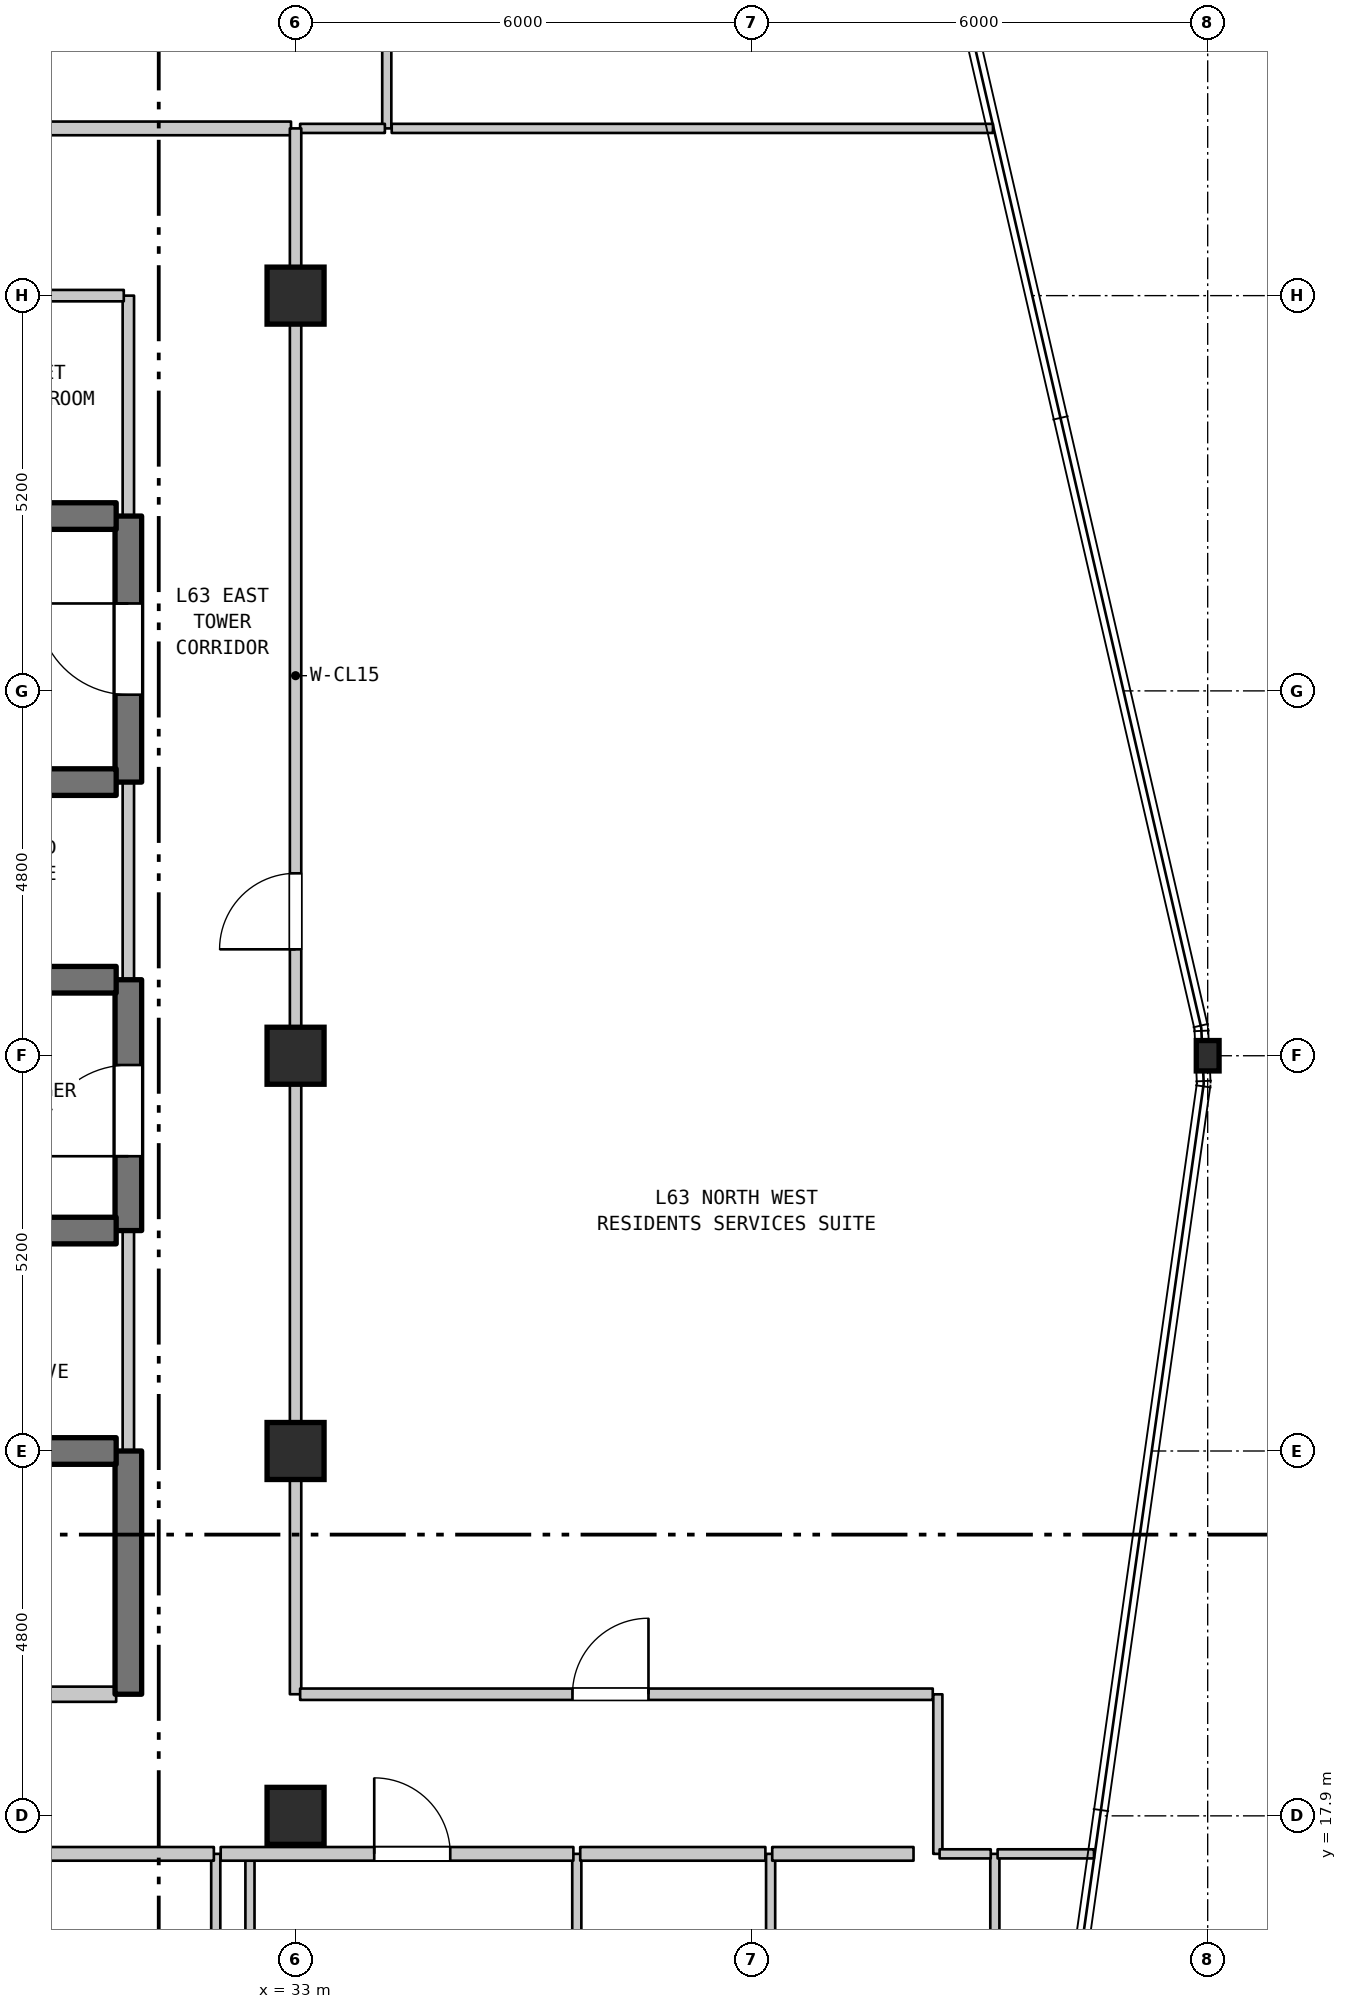
"""IFC4 building model, lengths in metres.
Left out: names, types, materials, properties, quantities, classifications, styles, units other than length and angle.
Written with IfcOpenShell. Run it as: python <this file> out.ifc"""

import sys

from ifc_helpers import new_model, si_unit, direction, frame, frame_2d, origin, origin_2d, place, context, subcontext, project, spatial, rectangle, i_section, extrude, element, fill, save


model = new_model("IFC4")
c1 = context("Model", 3, precision=1e-05, world=origin(), true_north=direction((0.0, 1.0)))
c2 = subcontext(c1, "Body", "Model", "MODEL_VIEW")
j1 = project(units=[si_unit("LENGTHUNIT", "METRE"), si_unit("PLANEANGLEUNIT", "RADIAN")], contexts=[c1])
p1 = place(None, origin())
s1 = spatial("IfcSite", under=j1, at=p1, CompositionType="ELEMENT")
p2 = place(p1, origin())
s2 = spatial("IfcBuilding", under=s1, at=p2, CompositionType="ELEMENT")
p3 = place(p2, frame((0.0, 0.0, 254.7)))
s3 = spatial("IfcBuildingStorey", under=s2, at=p3, CompositionType="ELEMENT", Elevation=254.7)
for number, where, z_axis, x_axis in (
    (1, (33.0, 17.9, 0.0), (0.0, 0.0, 1.0), (1.0, 0.0, 0.0)),
    (2, (33.0, 22.7, 0.0), (0.0, 0.0, 1.0), (1.0, 0.0, 0.0)),
    (3, (33.0, 27.9, 0.0), (0.0, 0.0, 1.0), (1.0, 0.0, 0.0)),
    (4, (33.0, 37.9, 0.0), (0.0, 0.0, 1.0), (1.0, 0.0, 0.0)),
):
    element("IfcColumn", number, at=place(p3, frame(where, z_axis=z_axis, x_axis=x_axis)), inside=s3, PredefinedType="COLUMN", context=c2, shape_type="SweptSolid", body=[
        extrude(rectangle(XDim=0.75, YDim=0.75, at=origin_2d()), origin(), (0.0, 0.0, 1.0), 3.7),
    ])
p4 = place(p3, frame((45.0, 27.9, 0.0), z_axis=(0.0, 0.0, 1.0), x_axis=(1.0, 0.0, 0.0)))
e5 = element("IfcColumn", 5, at=p4, inside=s3, PredefinedType="COLUMN", context=c2, shape_type="SweptSolid", body=[
    extrude(i_section(OverallWidth=0.3, OverallDepth=0.4, WebThickness=0.013, FlangeThickness=0.024, FilletRadius=0.027, at=origin_2d()), origin(), (0.0, 0.0, 1.0), 3.7),
])
p5 = place(p3, frame((30.8, 19.5, 0.0), z_axis=(0.0, 0.0, 1.0), x_axis=(0.0, 1.0, 0.0)))
e6 = element("IfcWall", 6, at=p5, inside=s3, PredefinedType="SHEAR", context=c2, shape_type="SweptSolid", body=[
    extrude(rectangle(XDim=3.2, YDim=0.35, at=frame_2d((1.6, 0.0))), origin(), (0.0, 0.0, 1.0), 3.39),
])
p6 = place(p3, frame((30.8, 22.7, 0.0), z_axis=(0.0, 0.0, 1.0), x_axis=(0.0, 1.0, 0.0)))
e7 = element("IfcWall", 7, at=p6, inside=s3, PredefinedType="STANDARD", context=c2, shape_type="SweptSolid", body=[
    extrude(rectangle(XDim=2.9, YDim=0.15, at=frame_2d((1.45, 0.0))), origin(), (0.0, 0.0, 1.0), 3.39),
])
p7 = place(p3, frame((30.8, 25.6, 0.0), z_axis=(0.0, 0.0, 1.0), x_axis=(0.0, 1.0, 0.0)))
e8 = element("IfcWall", 8, at=p7, inside=s3, PredefinedType="SHEAR", context=c2, shape_type="SweptSolid", body=[
    extrude(rectangle(XDim=3.3, YDim=0.35, at=frame_2d((1.65, 0.0))), origin(), (0.0, 0.0, 1.0), 3.39),
])
p8 = place(p7, frame((0.978, 0.0, 0.0)))
e9 = element("IfcOpeningElement", 9, at=p8, cuts=e8, PredefinedType="OPENING", context=c2, shape_type="SweptSolid", body=[
    extrude(rectangle(XDim=1.2, YDim=2.2, at=frame_2d((0.6, 1.1))), frame((0.0, 0.185, 0.0), z_axis=(0.0, -1.0, 0.0), x_axis=(1.0, 0.0, 0.0)), (0.0, 0.0, 1.0), 0.37),
])
p9 = place(p3, frame((30.8, 28.9, 0.0), z_axis=(0.0, 0.0, 1.0), x_axis=(0.0, 1.0, 0.0)))
e10 = element("IfcWall", 10, at=p9, inside=s3, PredefinedType="STANDARD", context=c2, shape_type="SweptSolid", body=[
    extrude(rectangle(XDim=2.6, YDim=0.15, at=frame_2d((1.3, 0.0))), origin(), (0.0, 0.0, 1.0), 3.39),
])
p10 = place(p3, frame((30.8, 31.5, 0.0), z_axis=(0.0, 0.0, 1.0), x_axis=(0.0, 1.0, 0.0)))
e11 = element("IfcWall", 11, at=p10, inside=s3, PredefinedType="SHEAR", context=c2, shape_type="SweptSolid", body=[
    extrude(rectangle(XDim=3.5, YDim=0.35, at=frame_2d((1.75, 0.0))), origin(), (0.0, 0.0, 1.0), 3.39),
])
p11 = place(p10, frame((1.15, 0.0, 0.0)))
e12 = element("IfcOpeningElement", 12, at=p11, cuts=e11, PredefinedType="OPENING", context=c2, shape_type="SweptSolid", body=[
    extrude(rectangle(XDim=1.2, YDim=2.2, at=frame_2d((0.6, 1.1))), frame((0.0, 0.185, 0.0), z_axis=(0.0, -1.0, 0.0), x_axis=(1.0, 0.0, 0.0)), (0.0, 0.0, 1.0), 0.37),
])
p12 = place(p3, frame((30.8, 35.0, 0.0), z_axis=(0.0, 0.0, 1.0), x_axis=(0.0, 1.0, 0.0)))
e13 = element("IfcWall", 13, at=p12, inside=s3, PredefinedType="STANDARD", context=c2, shape_type="SweptSolid", body=[
    extrude(rectangle(XDim=2.9, YDim=0.15, at=frame_2d((1.45, 0.0))), origin(), (0.0, 0.0, 1.0), 3.39),
])
p13 = place(p3, frame((31.95, 13.62, 0.0), z_axis=(0.0, 0.0, 1.0), x_axis=(0.0, 1.0, 0.0)))
e14 = element("IfcWall", 14, at=p13, inside=s3, PredefinedType="PARTITIONING", context=c2, shape_type="SweptSolid", body=[
    extrude(rectangle(XDim=3.78, YDim=0.12, at=frame_2d((1.89, 0.0))), origin(), (0.0, 0.0, 1.0), 3.39),
])
p14 = place(p3, frame((32.4, 6.71, 0.0), z_axis=(0.0, 0.0, 1.0), x_axis=(0.0, 1.0, 0.0)))
e15 = element("IfcWall", 15, at=p14, inside=s3, PredefinedType="PARTITIONING", context=c2, shape_type="SweptSolid", body=[
    extrude(rectangle(XDim=10.69, YDim=0.12, at=frame_2d((5.345, 0.0))), origin(), (0.0, 0.0, 1.0), 3.39),
])
p15 = place(p3, frame((33.0, 19.5, 0.0), z_axis=(0.0, 0.0, 1.0), x_axis=(0.0, 1.0, 0.0)))
e16 = element("IfcWall", 16, at=p15, inside=s3, PredefinedType="STANDARD", context=c2, shape_type="SweptSolid", body=[
    extrude(rectangle(XDim=8.4, YDim=0.15, at=frame_2d((4.2, 0.0))), origin(), (0.0, 0.0, 1.0), 3.1),
])
p16 = place(p3, frame((34.2, 40.1, 0.0), z_axis=(0.0, 0.0, 1.0), x_axis=(0.0, 1.0, 0.0)))
e17 = element("IfcWall", 17, at=p16, inside=s3, PredefinedType="PARTITIONING", context=c2, shape_type="SweptSolid", body=[
    extrude(rectangle(XDim=13.79, YDim=0.12, at=frame_2d((6.895, 0.0))), origin(), (0.0, 0.0, 1.0), 3.39),
])
p17 = place(p16, frame((1.852, 0.0, 0.0)))
e18 = element("IfcOpeningElement", 18, at=p17, cuts=e17, PredefinedType="OPENING", context=c2, shape_type="SweptSolid", body=[
    extrude(rectangle(XDim=0.9, YDim=2.15, at=frame_2d((0.45, 1.075))), frame((0.0, 0.07, 0.0), z_axis=(0.0, -1.0, 0.0), x_axis=(1.0, 0.0, 0.0)), (0.0, 0.0, 1.0), 0.14),
])
p18 = place(p16, frame((6.45, 0.0, 0.0)))
e19 = element("IfcOpeningElement", 19, at=p18, cuts=e17, PredefinedType="OPENING", context=c2, shape_type="SweptSolid", body=[
    extrude(rectangle(XDim=0.9, YDim=2.15, at=frame_2d((0.45, 1.075))), frame((0.0, 0.07, 0.0), z_axis=(0.0, -1.0, 0.0), x_axis=(1.0, 0.0, 0.0)), (0.0, 0.0, 1.0), 0.14),
])
p19 = place(p16, frame((10.898, 0.0, 0.0)))
e20 = element("IfcOpeningElement", 20, at=p19, cuts=e17, PredefinedType="OPENING", context=c2, shape_type="SweptSolid", body=[
    extrude(rectangle(XDim=0.9, YDim=2.15, at=frame_2d((0.45, 1.075))), frame((0.0, 0.07, 0.0), z_axis=(0.0, -1.0, 0.0), x_axis=(1.0, 0.0, 0.0)), (0.0, 0.0, 1.0), 0.14),
])
for number, where, z_axis, x_axis in (
    (21, (36.7, 13.62, 0.0), (0.0, 0.0, 1.0), (0.0, 1.0, 0.0)),
    (22, (39.25, 13.62, 0.0), (0.0, 0.0, 1.0), (0.0, 1.0, 0.0)),
):
    element("IfcWall", number, at=place(p3, frame(where, z_axis=z_axis, x_axis=x_axis)), inside=s3, PredefinedType="PARTITIONING", context=c2, shape_type="SweptSolid", body=[
        extrude(rectangle(XDim=3.78, YDim=0.12, at=frame_2d((1.89, 0.0))), origin(), (0.0, 0.0, 1.0), 3.39),
    ])
p20 = place(p3, frame((41.45, 17.4, 0.0), z_axis=(0.0, 0.0, 1.0), x_axis=(0.0, 1.0, 0.0)))
e23 = element("IfcWall", 23, at=p20, inside=s3, PredefinedType="PARTITIONING", context=c2, shape_type="SweptSolid", body=[
    extrude(rectangle(XDim=2.099, YDim=0.12, at=frame_2d((1.05, 0.0))), origin(), (0.0, 0.0, 1.0), 3.39),
])
p21 = place(p3, frame((42.2, 13.62, 0.0), z_axis=(0.0, 0.0, 1.0), x_axis=(0.0, 1.0, 0.0)))
e24 = element("IfcWall", 24, at=p21, inside=s3, PredefinedType="PARTITIONING", context=c2, shape_type="SweptSolid", body=[
    extrude(rectangle(XDim=3.78, YDim=0.12, at=frame_2d((1.89, 0.0))), origin(), (0.0, 0.0, 1.0), 3.39),
])
p22 = place(p3, frame((28.424, 17.4, 0.0), z_axis=(0.0, 0.0, 1.0), x_axis=(1.0, 0.0, 0.0)))
e25 = element("IfcWall", 25, at=p22, inside=s3, PredefinedType="STANDARD", context=c2, shape_type="SweptSolid", body=[
    extrude(rectangle(XDim=3.501, YDim=0.18, at=frame_2d((1.75, 0.0))), origin(), (0.0, 0.0, 1.0), 3.39),
])
p23 = place(p3, frame((32.015, 17.4, 0.0), z_axis=(0.0, 0.0, 1.0), x_axis=(1.0, 0.0, 0.0)))
e26 = element("IfcWall", 26, at=p23, inside=s3, PredefinedType="STANDARD", context=c2, shape_type="SweptSolid", body=[
    extrude(rectangle(XDim=4.64, YDim=0.18, at=frame_2d((2.32, 0.0))), origin(), (0.0, 0.0, 1.0), 3.39),
])
p24 = place(p23, frame((2.02, 0.0, 0.0)))
e27 = element("IfcOpeningElement", 27, at=p24, cuts=e26, PredefinedType="OPENING", context=c2, shape_type="SweptSolid", body=[
    extrude(rectangle(XDim=1.0, YDim=2.15, at=frame_2d((0.5, 1.075))), frame((0.0, 0.1, 0.0), z_axis=(0.0, -1.0, 0.0), x_axis=(1.0, 0.0, 0.0)), (0.0, 0.0, 1.0), 0.2),
])
p25 = place(p3, frame((36.745, 17.4, 0.0), z_axis=(0.0, 0.0, 1.0), x_axis=(1.0, 0.0, 0.0)))
e28 = element("IfcWall", 28, at=p25, inside=s3, PredefinedType="STANDARD", context=c2, shape_type="SweptSolid", body=[
    extrude(rectangle(XDim=2.436, YDim=0.18, at=frame_2d((1.218, 0.0))), origin(), (0.0, 0.0, 1.0), 3.39),
])
p26 = place(p3, frame((39.271, 17.4, 0.0), z_axis=(0.0, 0.0, 1.0), x_axis=(1.0, 0.0, 0.0)))
e29 = element("IfcWall", 29, at=p26, inside=s3, PredefinedType="STANDARD", context=c2, shape_type="SweptSolid", body=[
    extrude(rectangle(XDim=1.859, YDim=0.18, at=frame_2d((0.929, 0.0))), origin(), (0.0, 0.0, 1.0), 3.39),
])
p27 = place(p3, frame((41.473, 17.4, 0.0), z_axis=(0.0, 0.0, 1.0), x_axis=(1.0, 0.0, 0.0)))
e30 = element("IfcWall", 30, at=p27, inside=s3, PredefinedType="PARTITIONING", context=c2, shape_type="SweptSolid", body=[
    extrude(rectangle(XDim=0.673, YDim=0.12, at=frame_2d((0.336, 0.0))), origin(), (0.0, 0.0, 1.0), 3.39),
])
p28 = place(p3, frame((42.236, 17.4, 0.0), z_axis=(0.0, 0.0, 1.0), x_axis=(1.0, 0.0, 0.0)))
e31 = element("IfcWall", 31, at=p28, inside=s3, PredefinedType="PARTITIONING", context=c2, shape_type="SweptSolid", body=[
    extrude(rectangle(XDim=1.268, YDim=0.12, at=frame_2d((0.634, 0.0))), origin(), (0.0, 0.0, 1.0), 3.39),
])
p29 = place(p3, frame((25.985, 19.5, 0.0), z_axis=(0.0, 0.0, 1.0), x_axis=(1.0, 0.0, 0.0)))
e32 = element("IfcWall", 32, at=p29, inside=s3, PredefinedType="STANDARD", context=c2, shape_type="SweptSolid", body=[
    extrude(rectangle(XDim=4.655, YDim=0.2, at=frame_2d((2.327, 0.0))), origin(), (0.0, 0.0, 1.0), 3.39),
])
p30 = place(p29, frame((1.845, 0.0, 0.0)))
e33 = element("IfcOpeningElement", 33, at=p30, cuts=e32, PredefinedType="OPENING", context=c2, shape_type="SweptSolid", body=[
    extrude(rectangle(XDim=0.9, YDim=2.15, at=frame_2d((0.45, 1.075))), frame((0.0, 0.11, 0.0), z_axis=(0.0, -1.0, 0.0), x_axis=(1.0, 0.0, 0.0)), (0.0, 0.0, 1.0), 0.22),
])
p31 = place(p3, frame((33.06, 19.5, 0.0), z_axis=(0.0, 0.0, 1.0), x_axis=(1.0, 0.0, 0.0)))
e34 = element("IfcWall", 34, at=p31, inside=s3, PredefinedType="STANDARD", context=c2, shape_type="SweptSolid", body=[
    extrude(rectangle(XDim=8.323, YDim=0.15, at=frame_2d((4.162, 0.0))), origin(), (0.0, 0.0, 1.0), 3.39),
])
p32 = place(p31, frame((3.583, 0.0, 0.0)))
e35 = element("IfcOpeningElement", 35, at=p32, cuts=e34, PredefinedType="OPENING", context=c2, shape_type="SweptSolid", body=[
    extrude(rectangle(XDim=1.0, YDim=2.15, at=frame_2d((0.5, 1.075))), frame((0.0, 0.085, 0.0), z_axis=(0.0, -1.0, 0.0), x_axis=(1.0, 0.0, 0.0)), (0.0, 0.0, 1.0), 0.17),
])
p33 = place(p3, frame((27.46, 22.7, 0.0), z_axis=(0.0, 0.0, 1.0), x_axis=(1.0, 0.0, 0.0)))
e36 = element("IfcWall", 36, at=p33, inside=s3, PredefinedType="SHEAR", context=c2, shape_type="SweptSolid", body=[
    extrude(rectangle(XDim=3.18, YDim=0.35, at=frame_2d((1.59, 0.0))), origin(), (0.0, 0.0, 1.0), 3.39),
])
p34 = place(p3, frame((27.46, 25.6, 0.0), z_axis=(0.0, 0.0, 1.0), x_axis=(1.0, 0.0, 0.0)))
e37 = element("IfcWall", 37, at=p34, inside=s3, PredefinedType="SHEAR", context=c2, shape_type="SweptSolid", body=[
    extrude(rectangle(XDim=3.18, YDim=0.35, at=frame_2d((1.59, 0.0))), origin(), (0.0, 0.0, 1.0), 3.39),
])
p35 = place(p34, frame((1.115, 0.0, 0.0)))
e38 = element("IfcOpeningElement", 38, at=p35, cuts=e37, PredefinedType="OPENING", context=c2, shape_type="SweptSolid", body=[
    extrude(rectangle(XDim=0.95, YDim=2.15, at=frame_2d((0.475, 1.075))), frame((0.0, 0.185, 0.0), z_axis=(0.0, -1.0, 0.0), x_axis=(1.0, 0.0, 0.0)), (0.0, 0.0, 1.0), 0.37),
])
p36 = place(p3, frame((27.46, 28.9, 0.0), z_axis=(0.0, 0.0, 1.0), x_axis=(1.0, 0.0, 0.0)))
e39 = element("IfcWall", 39, at=p36, inside=s3, PredefinedType="SHEAR", context=c2, shape_type="SweptSolid", body=[
    extrude(rectangle(XDim=3.18, YDim=0.35, at=frame_2d((1.59, 0.0))), origin(), (0.0, 0.0, 1.0), 3.39),
])
p37 = place(p36, frame((1.115, 0.0, 0.0)))
e40 = element("IfcOpeningElement", 40, at=p37, cuts=e39, PredefinedType="OPENING", context=c2, shape_type="SweptSolid", body=[
    extrude(rectangle(XDim=0.95, YDim=2.15, at=frame_2d((0.475, 1.075))), frame((0.0, 0.185, 0.0), z_axis=(0.0, -1.0, 0.0), x_axis=(1.0, 0.0, 0.0)), (0.0, 0.0, 1.0), 0.37),
])
p38 = place(p3, frame((27.46, 31.5, 0.0), z_axis=(0.0, 0.0, 1.0), x_axis=(1.0, 0.0, 0.0)))
e41 = element("IfcWall", 41, at=p38, inside=s3, PredefinedType="SHEAR", context=c2, shape_type="SweptSolid", body=[
    extrude(rectangle(XDim=3.18, YDim=0.35, at=frame_2d((1.59, 0.0))), origin(), (0.0, 0.0, 1.0), 3.39),
])
p39 = place(p3, frame((26.645, 35.0, 0.0), z_axis=(0.0, 0.0, 1.0), x_axis=(1.0, 0.0, 0.0)))
e42 = element("IfcWall", 42, at=p39, inside=s3, PredefinedType="SHEAR", context=c2, shape_type="SweptSolid", body=[
    extrude(rectangle(XDim=3.995, YDim=0.35, at=frame_2d((1.998, 0.0))), origin(), (0.0, 0.0, 1.0), 3.39),
])
p40 = place(p39, frame((1.508, 0.0, 0.0)))
e43 = element("IfcOpeningElement", 43, at=p40, cuts=e42, PredefinedType="OPENING", context=c2, shape_type="SweptSolid", body=[
    extrude(rectangle(XDim=0.95, YDim=2.15, at=frame_2d((0.475, 1.075))), frame((0.0, 0.185, 0.0), z_axis=(0.0, -1.0, 0.0), x_axis=(1.0, 0.0, 0.0)), (0.0, 0.0, 1.0), 0.37),
])
p41 = place(p3, frame((26.645, 37.9, 0.0), z_axis=(0.0, 0.0, 1.0), x_axis=(1.0, 0.0, 0.0)))
e44 = element("IfcWall", 44, at=p41, inside=s3, PredefinedType="STANDARD", context=c2, shape_type="SweptSolid", body=[
    extrude(rectangle(XDim=4.095, YDim=0.15, at=frame_2d((2.047, 0.0))), origin(), (0.0, 0.0, 1.0), 2.89),
])
p42 = place(p3, frame((28.895, 40.1, 0.0), z_axis=(0.0, 0.0, 1.0), x_axis=(1.0, 0.0, 0.0)))
e45 = element("IfcWall", 45, at=p42, inside=s3, PredefinedType="STANDARD", context=c2, shape_type="SweptSolid", body=[
    extrude(rectangle(XDim=4.045, YDim=0.18, at=frame_2d((2.022, 0.0))), origin(), (0.0, 0.0, 1.0), 3.39),
])
p43 = place(p3, frame((33.06, 40.1, 0.0), z_axis=(0.0, 0.0, 1.0), x_axis=(1.0, 0.0, 0.0)))
e46 = element("IfcWall", 46, at=p43, inside=s3, PredefinedType="PARTITIONING", context=c2, shape_type="SweptSolid", body=[
    extrude(rectangle(XDim=1.115, YDim=0.12, at=frame_2d((0.558, 0.0))), origin(), (0.0, 0.0, 1.0), 3.39),
])
p44 = place(p3, frame((34.265, 40.1, 0.0), z_axis=(0.0, 0.0, 1.0), x_axis=(1.0, 0.0, 0.0)))
e47 = element("IfcWall", 47, at=p44, inside=s3, PredefinedType="PARTITIONING", context=c2, shape_type="SweptSolid", body=[
    extrude(rectangle(XDim=7.91, YDim=0.12, at=frame_2d((3.955, 0.0))), origin(), (0.0, 0.0, 1.0), 3.39),
])
p45 = place(p3, frame((33.0, 27.9, 0.0), z_axis=(0.0, 0.0, 1.0), x_axis=(0.0, 1.0, 0.0)))
e48 = element("IfcWall", 48, at=p45, inside=s3, PredefinedType="STANDARD", context=c2, shape_type="SweptSolid", body=[
    extrude(rectangle(XDim=10.0, YDim=0.15, at=frame_2d((5.0, 0.0))), origin(), (0.0, 0.0, 1.0), 2.89),
])
p46 = place(p45, frame((1.4, 0.0, 0.0)))
e49 = element("IfcOpeningElement", 49, at=p46, cuts=e48, PredefinedType="OPENING", context=c2, shape_type="SweptSolid", body=[
    extrude(rectangle(XDim=1.0, YDim=2.15, at=frame_2d((0.5, 1.075))), frame((0.0, 0.085, 0.0), z_axis=(0.0, -1.0, 0.0), x_axis=(1.0, 0.0, 0.0)), (0.0, 0.0, 1.0), 0.17),
])
p47 = place(p3, frame((33.0, 37.9, 0.0), z_axis=(0.0, 0.0, 1.0), x_axis=(0.0, 1.0, 0.0)))
e50 = element("IfcWall", 50, at=p47, inside=s3, PredefinedType="STANDARD", context=c2, shape_type="SweptSolid", body=[
    extrude(rectangle(XDim=2.2, YDim=0.15, at=frame_2d((1.1, 0.0))), origin(), (0.0, 0.0, 1.0), 2.79),
])
p48 = place(p8, origin())
e51 = element("IfcDoor", 51, at=p48, inside=s3, OperationType="SINGLE_SWING_LEFT", PredefinedType="DOOR", context=c2, shape_type="SweptSolid", body=[
    extrude(rectangle(XDim=1.2, YDim=2.2, at=frame_2d((0.6, 1.1))), frame((0.0, 0.025, 0.0), z_axis=(0.0, -1.0, 0.0), x_axis=(1.0, 0.0, 0.0)), (0.0, 0.0, 1.0), 0.05),
])
fill(e9, e51)
p49 = place(p11, origin())
e52 = element("IfcDoor", 52, at=p49, inside=s3, OperationType="SINGLE_SWING_RIGHT", PredefinedType="DOOR", context=c2, shape_type="SweptSolid", body=[
    extrude(rectangle(XDim=1.2, YDim=2.2, at=frame_2d((0.6, 1.1))), frame((0.0, 0.025, 0.0), z_axis=(0.0, -1.0, 0.0), x_axis=(1.0, 0.0, 0.0)), (0.0, 0.0, 1.0), 0.05),
])
fill(e12, e52)
p50 = place(p46, origin())
e53 = element("IfcDoor", 53, at=p50, inside=s3, OperationType="SINGLE_SWING_LEFT", PredefinedType="DOOR", context=c2, shape_type="SweptSolid", body=[
    extrude(rectangle(XDim=1.0, YDim=2.15, at=frame_2d((0.5, 1.075))), frame((0.0, 0.025, 0.0), z_axis=(0.0, -1.0, 0.0), x_axis=(1.0, 0.0, 0.0)), (0.0, 0.0, 1.0), 0.05),
])
fill(e49, e53)
p51 = place(p24, origin())
e54 = element("IfcDoor", 54, at=p51, inside=s3, OperationType="SINGLE_SWING_LEFT", PredefinedType="DOOR", context=c2, shape_type="SweptSolid", body=[
    extrude(rectangle(XDim=1.0, YDim=2.15, at=frame_2d((0.5, 1.075))), frame((0.0, 0.025, 0.0), z_axis=(0.0, -1.0, 0.0), x_axis=(1.0, 0.0, 0.0)), (0.0, 0.0, 1.0), 0.05),
])
fill(e27, e54)
p52 = place(p32, origin())
e55 = element("IfcDoor", 55, at=p52, inside=s3, OperationType="SINGLE_SWING_RIGHT", PredefinedType="DOOR", context=c2, shape_type="SweptSolid", body=[
    extrude(rectangle(XDim=1.0, YDim=2.15, at=frame_2d((0.5, 1.075))), frame((0.0, 0.025, 0.0), z_axis=(0.0, -1.0, 0.0), x_axis=(1.0, 0.0, 0.0)), (0.0, 0.0, 1.0), 0.05),
])
fill(e35, e55)
save(model, sys.argv[1])
